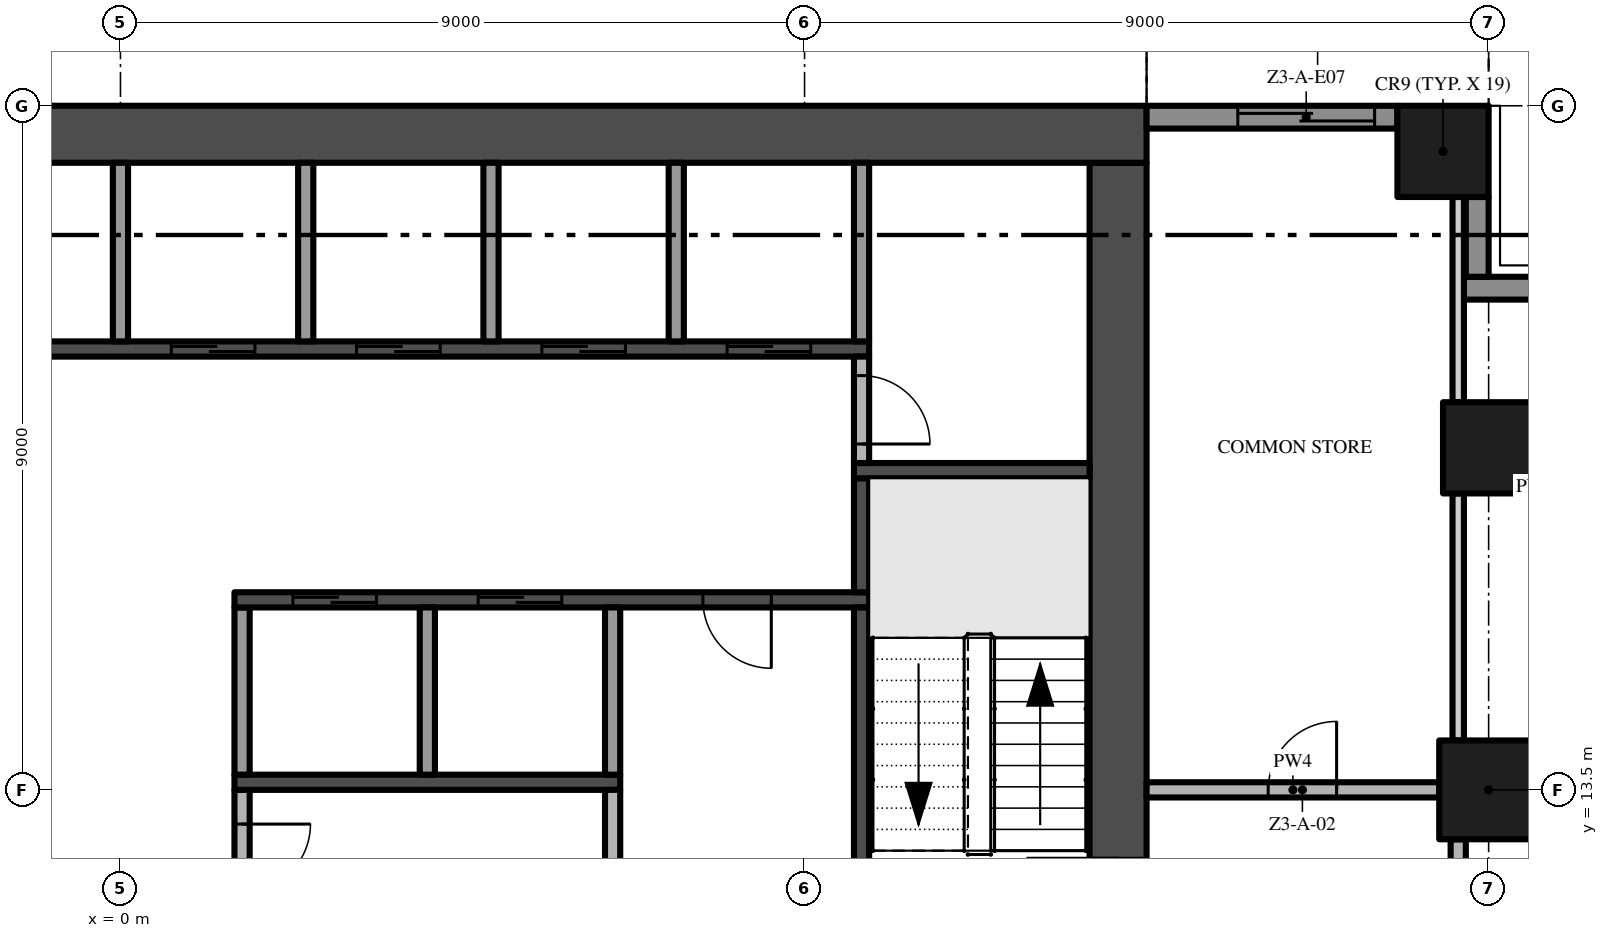
"""IFC4 building model, lengths in metres.
Left out: names, types, materials, properties, quantities, classifications, styles, units other than length and angle.
Written with IfcOpenShell. Run it as: python <this file> out.ifc"""

import sys

from ifc_helpers import new_model, si_unit, direction, frame, frame_2d, origin, origin_2d, place, context, subcontext, project, spatial, polyline, rectangle, outline, extrude, element, fill, save


model = new_model("IFC4")
c1 = context("Model", 3, precision=1e-05, world=origin(), true_north=direction((0.0, 1.0)))
c2 = subcontext(c1, "Body", "Model", "MODEL_VIEW")
j1 = project(units=[si_unit("LENGTHUNIT", "METRE"), si_unit("PLANEANGLEUNIT", "RADIAN")], contexts=[c1])
p1 = place(None, origin())
s1 = spatial("IfcSite", under=j1, at=p1, CompositionType="ELEMENT")
p2 = place(p1, origin())
s2 = spatial("IfcBuilding", under=s1, at=p2, CompositionType="ELEMENT")
p3 = place(p2, frame((0.0, 0.0, 125.0)))
s3 = spatial("IfcBuildingStorey", under=s2, at=p3, CompositionType="ELEMENT", Elevation=125.0)
p4 = place(p3, frame((13.125, 5.25, -0.3), z_axis=(0.0, 0.0, 1.0), x_axis=(0.0, 1.0, 0.0)))
e1 = element("IfcWall", 1, at=p4, inside=s3, PredefinedType="SHEAR", context=c2, shape_type="SweptSolid", body=[
    extrude(rectangle(XDim=16.5, YDim=0.75, at=frame_2d((8.25, 0.0))), origin(), (0.0, 0.0, 1.0), 3.8),
])
p5 = place(p4, frame((6.15, 0.0, 0.3)))
e2 = element("IfcOpeningElement", 2, at=p5, cuts=e1, PredefinedType="OPENING", context=c2, shape_type="SweptSolid", body=[
    extrude(rectangle(XDim=1.2, YDim=2.2, at=frame_2d((0.6, 1.1))), frame((0.0, 0.385, 0.0), z_axis=(0.0, -1.0, 0.0), x_axis=(1.0, 0.0, 0.0)), (0.0, 0.0, 1.0), 0.77),
])
p6 = place(p3, frame((13.5, 22.125, -0.3), z_axis=(0.0, 0.0, 1.0), x_axis=(-1.0, 0.0, 0.0)))
e3 = element("IfcWall", 3, at=p6, inside=s3, PredefinedType="SHEAR", context=c2, shape_type="SweptSolid", body=[
    extrude(rectangle(XDim=27.0, YDim=0.75, at=frame_2d((13.5, 0.0))), origin(), (0.0, 0.0, 1.0), 3.8),
])
p7 = place(p3, frame((18.0, 13.5, 0.0), z_axis=(0.0, 0.0, 1.0), x_axis=(1.0, 0.0, 0.0)))
e4 = element("IfcColumn", 4, at=p7, inside=s3, PredefinedType="COLUMN", context=c2, shape_type="SweptSolid", body=[
    extrude(rectangle(XDim=1.3, YDim=1.3, at=origin_2d()), origin(), (0.0, 0.0, 1.0), 3.5),
])
for number, where, z_axis, x_axis in (
    (5, (17.4, 21.9, 0.0), (0.0, 0.0, 1.0), (1.0, 0.0, 0.0)),
    (6, (18.0, 18.0, 0.0), (0.0, 0.0, 1.0), (1.0, 0.0, 0.0)),
):
    element("IfcColumn", number, at=place(p3, frame(where, z_axis=z_axis, x_axis=x_axis)), inside=s3, PredefinedType="COLUMN", context=c2, shape_type="SweptSolid", body=[
        extrude(rectangle(XDim=1.2, YDim=1.2, at=origin_2d()), origin(), (0.0, 0.0, 1.0), 3.5),
    ])
p8 = place(p3, frame((17.6, 20.1, 0.0), z_axis=(0.0, 0.0, 1.0), x_axis=(1.0, 0.0, 0.0)))
e7 = element("IfcWall", 7, at=p8, inside=s3, PredefinedType="SOLIDWALL", context=c2, shape_type="SweptSolid", body=[
    extrude(rectangle(XDim=2.35, YDim=0.3, at=frame_2d((1.175, 0.0))), origin(), (0.0, 0.0, 1.0), 3.5),
])
p9 = place(p3, frame((17.85, 21.3, 0.0), z_axis=(0.0, 0.0, 1.0), x_axis=(0.0, -1.0, 0.0)))
e8 = element("IfcWall", 8, at=p9, inside=s3, PredefinedType="SOLIDWALL", context=c2, shape_type="SweptSolid", body=[
    extrude(rectangle(XDim=1.05, YDim=0.3, at=frame_2d((0.525, 0.0))), origin(), (0.0, 0.0, 1.0), 3.5),
])
p10 = place(p3, frame((13.5, 22.35, 0.0), z_axis=(0.0, 0.0, 1.0), x_axis=(1.0, 0.0, 0.0)))
e9 = element("IfcWall", 9, at=p10, inside=s3, PredefinedType="SOLIDWALL", context=c2, shape_type="SweptSolid", body=[
    extrude(rectangle(XDim=3.3, YDim=0.3, at=frame_2d((1.65, 0.0))), origin(), (0.0, 0.0, 1.0), 3.5),
])
p11 = place(p10, frame((1.2, 0.0, 0.0)))
e10 = element("IfcOpeningElement", 10, at=p11, cuts=e9, PredefinedType="OPENING", context=c2, shape_type="SweptSolid", body=[
    extrude(rectangle(XDim=1.8, YDim=2.4, at=frame_2d((0.9, 1.2))), frame((0.0, 0.16, 0.0), z_axis=(0.0, -1.0, 0.0), x_axis=(1.0, 0.0, 0.0)), (0.0, 0.0, 1.0), 0.32),
])
p12 = place(p3, origin())
e11 = element("IfcWall", 11, at=p12, inside=s3, PredefinedType="USERDEFINED", context=c2, shape_type="SweptSolid", body=[
    extrude(outline(polyline([(18.0, 25.149), (16.5, 24.488), (15.0, 23.755), (13.5, 23.231), (13.583, 22.995), (15.096, 23.524), (16.605, 24.261), (18.101, 24.92), (18.0, 25.149)])), origin(), (0.0, 0.0, 1.0), 0.9),
])
p13 = place(p3, frame((-9.85, 19.3, 0.0), z_axis=(0.0, 0.0, 1.0), x_axis=(1.0, 0.0, 0.0)))
e12 = element("IfcWall", 12, at=p13, inside=s3, PredefinedType="SHEAR", context=c2, shape_type="SweptSolid", body=[
    extrude(rectangle(XDim=19.7, YDim=0.2, at=frame_2d((9.85, 0.0))), origin(), (0.0, 0.0, 1.0), 3.5),
])
p14 = place(p13, frame((10.519, 0.0, 0.0)))
e13 = element("IfcOpeningElement", 13, at=p14, cuts=e12, PredefinedType="OPENING", context=c2, shape_type="SweptSolid", body=[
    extrude(rectangle(XDim=1.1, YDim=2.1, at=frame_2d((0.55, 1.05))), frame((0.0, 0.11, 0.0), z_axis=(0.0, -1.0, 0.0), x_axis=(1.0, 0.0, 0.0)), (0.0, 0.0, 1.0), 0.22),
])
p15 = place(p13, frame((12.956, 0.0, 0.0)))
e14 = element("IfcOpeningElement", 14, at=p15, cuts=e12, PredefinedType="OPENING", context=c2, shape_type="SweptSolid", body=[
    extrude(rectangle(XDim=1.1, YDim=2.1, at=frame_2d((0.55, 1.05))), frame((0.0, 0.11, 0.0), z_axis=(0.0, -1.0, 0.0), x_axis=(1.0, 0.0, 0.0)), (0.0, 0.0, 1.0), 0.22),
])
p16 = place(p13, frame((15.394, 0.0, 0.0)))
e15 = element("IfcOpeningElement", 15, at=p16, cuts=e12, PredefinedType="OPENING", context=c2, shape_type="SweptSolid", body=[
    extrude(rectangle(XDim=1.1, YDim=2.1, at=frame_2d((0.55, 1.05))), frame((0.0, 0.11, 0.0), z_axis=(0.0, -1.0, 0.0), x_axis=(1.0, 0.0, 0.0)), (0.0, 0.0, 1.0), 0.22),
])
p17 = place(p13, frame((17.831, 0.0, 0.0)))
e16 = element("IfcOpeningElement", 16, at=p17, cuts=e12, PredefinedType="OPENING", context=c2, shape_type="SweptSolid", body=[
    extrude(rectangle(XDim=1.1, YDim=2.1, at=frame_2d((0.55, 1.05))), frame((0.0, 0.11, 0.0), z_axis=(0.0, -1.0, 0.0), x_axis=(1.0, 0.0, 0.0)), (0.0, 0.0, 1.0), 0.22),
])
p18 = place(p3, frame((0.0, 19.4, 0.0), z_axis=(0.0, 0.0, 1.0), x_axis=(0.0, 1.0, 0.0)))
e17 = element("IfcWall", 17, at=p18, inside=s3, PredefinedType="PARTITIONING", context=c2, shape_type="SweptSolid", body=[
    extrude(rectangle(XDim=2.35, YDim=0.2, at=frame_2d((1.175, 0.0))), origin(), (0.0, 0.0, 1.0), 3.5),
])
p19 = place(p3, frame((1.6, 13.5, 0.0), z_axis=(0.0, 0.0, 1.0), x_axis=(0.0, -1.0, 0.0)))
e18 = element("IfcWall", 18, at=p19, inside=s3, PredefinedType="PARTITIONING", context=c2, shape_type="SweptSolid", body=[
    extrude(rectangle(XDim=1.8, YDim=0.2, at=frame_2d((0.9, 0.0))), origin(), (0.0, 0.0, 1.0), 3.5),
])
p20 = place(p19, frame((0.45, 0.0, 0.0)))
e19 = element("IfcOpeningElement", 19, at=p20, cuts=e18, PredefinedType="OPENING", context=c2, shape_type="SweptSolid", body=[
    extrude(rectangle(XDim=0.9, YDim=2.1, at=frame_2d((0.45, 1.05))), frame((0.0, 0.11, 0.0), z_axis=(0.0, -1.0, 0.0), x_axis=(1.0, 0.0, 0.0)), (0.0, 0.0, 1.0), 0.22),
])
p21 = place(p3, frame((1.5, 13.6, 0.0), z_axis=(0.0, 0.0, 1.0), x_axis=(1.0, 0.0, 0.0)))
e20 = element("IfcWall", 20, at=p21, inside=s3, PredefinedType="SHEAR", context=c2, shape_type="SweptSolid", body=[
    extrude(rectangle(XDim=5.075, YDim=0.2, at=frame_2d((2.538, 0.0))), origin(), (0.0, 0.0, 1.0), 3.5),
])
p22 = place(p3, frame((1.6, 13.7, 0.0), z_axis=(0.0, 0.0, 1.0), x_axis=(0.0, 1.0, 0.0)))
e21 = element("IfcWall", 21, at=p22, inside=s3, PredefinedType="PARTITIONING", context=c2, shape_type="SweptSolid", body=[
    extrude(rectangle(XDim=2.2, YDim=0.2, at=frame_2d((1.1, 0.0))), origin(), (0.0, 0.0, 1.0), 3.5),
])
p23 = place(p3, frame((9.85, 16.0, 0.0), z_axis=(0.0, 0.0, 1.0), x_axis=(-1.0, 0.0, 0.0)))
e22 = element("IfcWall", 22, at=p23, inside=s3, PredefinedType="SHEAR", context=c2, shape_type="SweptSolid", body=[
    extrude(rectangle(XDim=8.35, YDim=0.2, at=frame_2d((4.175, 0.0))), origin(), (0.0, 0.0, 1.0), 3.5),
])
p24 = place(p23, frame((6.481, 0.0, 0.0)))
e23 = element("IfcOpeningElement", 23, at=p24, cuts=e22, PredefinedType="OPENING", context=c2, shape_type="SweptSolid", body=[
    extrude(rectangle(XDim=1.1, YDim=2.1, at=frame_2d((0.55, 1.05))), frame((0.0, 0.11, 0.0), z_axis=(0.0, -1.0, 0.0), x_axis=(1.0, 0.0, 0.0)), (0.0, 0.0, 1.0), 0.22),
])
p25 = place(p23, frame((4.044, 0.0, 0.0)))
e24 = element("IfcOpeningElement", 24, at=p25, cuts=e22, PredefinedType="OPENING", context=c2, shape_type="SweptSolid", body=[
    extrude(rectangle(XDim=1.1, YDim=2.1, at=frame_2d((0.55, 1.05))), frame((0.0, 0.11, 0.0), z_axis=(0.0, -1.0, 0.0), x_axis=(1.0, 0.0, 0.0)), (0.0, 0.0, 1.0), 0.22),
])
p26 = place(p23, frame((1.288, 0.0, 0.0)))
e25 = element("IfcOpeningElement", 25, at=p26, cuts=e22, PredefinedType="OPENING", context=c2, shape_type="SweptSolid", body=[
    extrude(rectangle(XDim=0.9, YDim=2.1, at=frame_2d((0.45, 1.05))), frame((0.0, 0.11, 0.0), z_axis=(0.0, -1.0, 0.0), x_axis=(1.0, 0.0, 0.0)), (0.0, 0.0, 1.0), 0.22),
])
p27 = place(p3, frame((2.438, 19.4, 0.0), z_axis=(0.0, 0.0, 1.0), x_axis=(0.0, 1.0, 0.0)))
e26 = element("IfcWall", 26, at=p27, inside=s3, PredefinedType="PARTITIONING", context=c2, shape_type="SweptSolid", body=[
    extrude(rectangle(XDim=2.35, YDim=0.2, at=frame_2d((1.175, 0.0))), origin(), (0.0, 0.0, 1.0), 3.5),
])
p28 = place(p3, frame((4.037, 13.7, 0.0), z_axis=(0.0, 0.0, 1.0), x_axis=(0.0, 1.0, 0.0)))
e27 = element("IfcWall", 27, at=p28, inside=s3, PredefinedType="PARTITIONING", context=c2, shape_type="SweptSolid", body=[
    extrude(rectangle(XDim=2.2, YDim=0.2, at=frame_2d((1.1, 0.0))), origin(), (0.0, 0.0, 1.0), 3.5),
])
p29 = place(p3, frame((4.875, 19.4, 0.0), z_axis=(0.0, 0.0, 1.0), x_axis=(0.0, 1.0, 0.0)))
e28 = element("IfcWall", 28, at=p29, inside=s3, PredefinedType="PARTITIONING", context=c2, shape_type="SweptSolid", body=[
    extrude(rectangle(XDim=2.35, YDim=0.2, at=frame_2d((1.175, 0.0))), origin(), (0.0, 0.0, 1.0), 3.5),
])
p30 = place(p3, frame((6.475, 12.3, 0.0), z_axis=(0.0, 0.0, 1.0), x_axis=(0.0, 1.0, 0.0)))
e29 = element("IfcWall", 29, at=p30, inside=s3, PredefinedType="PARTITIONING", context=c2, shape_type="SweptSolid", body=[
    extrude(rectangle(XDim=1.2, YDim=0.2, at=frame_2d((0.6, 0.0))), origin(), (0.0, 0.0, 1.0), 3.5),
])
p31 = place(p3, frame((6.475, 13.7, 0.0), z_axis=(0.0, 0.0, 1.0), x_axis=(0.0, 1.0, 0.0)))
e30 = element("IfcWall", 30, at=p31, inside=s3, PredefinedType="PARTITIONING", context=c2, shape_type="SweptSolid", body=[
    extrude(rectangle(XDim=2.2, YDim=0.2, at=frame_2d((1.1, 0.0))), origin(), (0.0, 0.0, 1.0), 3.5),
])
p32 = place(p3, frame((7.312, 19.4, 0.0), z_axis=(0.0, 0.0, 1.0), x_axis=(0.0, 1.0, 0.0)))
e31 = element("IfcWall", 31, at=p32, inside=s3, PredefinedType="PARTITIONING", context=c2, shape_type="SweptSolid", body=[
    extrude(rectangle(XDim=2.35, YDim=0.2, at=frame_2d((1.175, 0.0))), origin(), (0.0, 0.0, 1.0), 3.5),
])
p33 = place(p3, frame((9.75, 12.3, 0.0), z_axis=(0.0, 0.0, 1.0), x_axis=(0.0, 1.0, 0.0)))
e32 = element("IfcWall", 32, at=p33, inside=s3, PredefinedType="SHEAR", context=c2, shape_type="SweptSolid", body=[
    extrude(rectangle(XDim=3.6, YDim=0.2, at=frame_2d((1.8, 0.0))), origin(), (0.0, 0.0, 1.0), 3.5),
])
p34 = place(p3, frame((9.75, 16.1, 0.0), z_axis=(0.0, 0.0, 1.0), x_axis=(0.0, 1.0, 0.0)))
e33 = element("IfcWall", 33, at=p34, inside=s3, PredefinedType="SHEAR", context=c2, shape_type="SweptSolid", body=[
    extrude(rectangle(XDim=1.5, YDim=0.2, at=frame_2d((0.75, 0.0))), origin(), (0.0, 0.0, 1.0), 3.5),
])
p35 = place(p3, frame((9.65, 17.7, 0.0), z_axis=(0.0, 0.0, 1.0), x_axis=(1.0, 0.0, 0.0)))
e34 = element("IfcWall", 34, at=p35, inside=s3, PredefinedType="SHEAR", context=c2, shape_type="SweptSolid", body=[
    extrude(rectangle(XDim=3.1, YDim=0.2, at=frame_2d((1.55, 0.0))), origin(), (0.0, 0.0, 1.0), 3.5),
])
p36 = place(p3, frame((9.75, 19.2, 0.0), z_axis=(0.0, 0.0, 1.0), x_axis=(0.0, -1.0, 0.0)))
e35 = element("IfcWall", 35, at=p36, inside=s3, PredefinedType="PARTITIONING", context=c2, shape_type="SweptSolid", body=[
    extrude(rectangle(XDim=1.4, YDim=0.2, at=frame_2d((0.7, 0.0))), origin(), (0.0, 0.0, 1.0), 3.5),
])
p37 = place(p36, frame((0.25, 0.0, 0.0)))
e36 = element("IfcOpeningElement", 36, at=p37, cuts=e35, PredefinedType="OPENING", context=c2, shape_type="SweptSolid", body=[
    extrude(rectangle(XDim=0.9, YDim=2.1, at=frame_2d((0.45, 1.05))), frame((0.0, 0.11, 0.0), z_axis=(0.0, -1.0, 0.0), x_axis=(1.0, 0.0, 0.0)), (0.0, 0.0, 1.0), 0.22),
])
p38 = place(p3, frame((9.75, 19.4, 0.0), z_axis=(0.0, 0.0, 1.0), x_axis=(0.0, 1.0, 0.0)))
e37 = element("IfcWall", 37, at=p38, inside=s3, PredefinedType="PARTITIONING", context=c2, shape_type="SweptSolid", body=[
    extrude(rectangle(XDim=2.35, YDim=0.2, at=frame_2d((1.175, 0.0))), origin(), (0.0, 0.0, 1.0), 3.5),
])
p39 = place(p3, frame((13.5, 13.5, 0.0), z_axis=(0.0, 0.0, 1.0), x_axis=(1.0, 0.0, 0.0)))
e38 = element("IfcWall", 38, at=p39, inside=s3, PredefinedType="PARTITIONING", context=c2, shape_type="SweptSolid", body=[
    extrude(rectangle(XDim=3.85, YDim=0.2, at=frame_2d((1.925, 0.0))), origin(), (0.0, 0.0, 1.0), 3.5),
])
p40 = place(p39, frame((1.6, 0.0, 0.0)))
e39 = element("IfcOpeningElement", 39, at=p40, cuts=e38, PredefinedType="OPENING", context=c2, shape_type="SweptSolid", body=[
    extrude(rectangle(XDim=0.9, YDim=2.1, at=frame_2d((0.45, 1.05))), frame((0.0, 0.11, 0.0), z_axis=(0.0, -1.0, 0.0), x_axis=(1.0, 0.0, 0.0)), (0.0, 0.0, 1.0), 0.22),
])
p41 = place(p3, frame((17.6, 12.85, 0.0), z_axis=(0.0, 0.0, 1.0), x_axis=(0.0, -1.0, 0.0)))
e40 = element("IfcWall", 40, at=p41, inside=s3, PredefinedType="PARTITIONING", context=c2, shape_type="SweptSolid", body=[
    extrude(rectangle(XDim=7.7, YDim=0.2, at=frame_2d((3.85, 0.0))), origin(), (0.0, 0.0, 1.0), 3.5),
])
p42 = place(p41, frame((5.5, 0.0, 0.0)))
e41 = element("IfcOpeningElement", 41, at=p42, cuts=e40, PredefinedType="OPENING", context=c2, shape_type="SweptSolid", body=[
    extrude(rectangle(XDim=1.2, YDim=2.4, at=frame_2d((0.6, 1.2))), frame((0.0, 0.11, 0.0), z_axis=(0.0, -1.0, 0.0), x_axis=(1.0, 0.0, 0.0)), (0.0, 0.0, 1.0), 0.22),
])
p43 = place(p3, frame((17.6, 14.15, 0.0), z_axis=(0.0, 0.0, 1.0), x_axis=(0.0, 1.0, 0.0)))
e42 = element("IfcWall", 42, at=p43, inside=s3, PredefinedType="PARTITIONING", context=c2, shape_type="SweptSolid", body=[
    extrude(rectangle(XDim=3.25, YDim=0.15, at=frame_2d((1.625, 0.0))), origin(), (0.0, 0.0, 1.0), 3.5),
])
p44 = place(p3, frame((17.6, 18.6, 0.0), z_axis=(0.0, 0.0, 1.0), x_axis=(0.0, 1.0, 0.0)))
e43 = element("IfcWall", 43, at=p44, inside=s3, PredefinedType="PARTITIONING", context=c2, shape_type="SweptSolid", body=[
    extrude(rectangle(XDim=2.7, YDim=0.15, at=frame_2d((1.35, 0.0))), origin(), (0.0, 0.0, 1.0), 3.5),
])
p45 = place(p11, origin())
e44 = element("IfcDoor", 44, at=p45, inside=s3, OperationType="SINGLE_SWING_LEFT", PredefinedType="DOOR", context=c2, shape_type="SweptSolid", body=[
    extrude(rectangle(XDim=1.8, YDim=2.4, at=frame_2d((0.9, 1.2))), frame((0.0, 0.025, 0.0), z_axis=(0.0, -1.0, 0.0), x_axis=(1.0, 0.0, 0.0)), (0.0, 0.0, 1.0), 0.05),
])
fill(e10, e44)
p46 = place(p14, origin())
e45 = element("IfcDoor", 45, at=p46, inside=s3, OperationType="SLIDING_TO_RIGHT", PredefinedType="DOOR", context=c2, shape_type="SweptSolid", body=[
    extrude(rectangle(XDim=1.1, YDim=2.1, at=frame_2d((0.55, 1.05))), frame((0.0, 0.025, 0.0), z_axis=(0.0, -1.0, 0.0), x_axis=(1.0, 0.0, 0.0)), (0.0, 0.0, 1.0), 0.05),
])
fill(e13, e45)
p47 = place(p15, origin())
e46 = element("IfcDoor", 46, at=p47, inside=s3, OperationType="SLIDING_TO_RIGHT", PredefinedType="DOOR", context=c2, shape_type="SweptSolid", body=[
    extrude(rectangle(XDim=1.1, YDim=2.1, at=frame_2d((0.55, 1.05))), frame((0.0, 0.025, 0.0), z_axis=(0.0, -1.0, 0.0), x_axis=(1.0, 0.0, 0.0)), (0.0, 0.0, 1.0), 0.05),
])
fill(e14, e46)
p48 = place(p16, origin())
e47 = element("IfcDoor", 47, at=p48, inside=s3, OperationType="SLIDING_TO_RIGHT", PredefinedType="DOOR", context=c2, shape_type="SweptSolid", body=[
    extrude(rectangle(XDim=1.1, YDim=2.1, at=frame_2d((0.55, 1.05))), frame((0.0, 0.025, 0.0), z_axis=(0.0, -1.0, 0.0), x_axis=(1.0, 0.0, 0.0)), (0.0, 0.0, 1.0), 0.05),
])
fill(e15, e47)
p49 = place(p17, origin())
e48 = element("IfcDoor", 48, at=p49, inside=s3, OperationType="SLIDING_TO_RIGHT", PredefinedType="DOOR", context=c2, shape_type="SweptSolid", body=[
    extrude(rectangle(XDim=1.1, YDim=2.1, at=frame_2d((0.55, 1.05))), frame((0.0, 0.025, 0.0), z_axis=(0.0, -1.0, 0.0), x_axis=(1.0, 0.0, 0.0)), (0.0, 0.0, 1.0), 0.05),
])
fill(e16, e48)
p50 = place(p24, origin())
e49 = element("IfcDoor", 49, at=p50, inside=s3, OperationType="SLIDING_TO_RIGHT", PredefinedType="DOOR", context=c2, shape_type="SweptSolid", body=[
    extrude(rectangle(XDim=1.1, YDim=2.1, at=frame_2d((0.55, 1.05))), frame((0.0, 0.025, 0.0), z_axis=(0.0, -1.0, 0.0), x_axis=(1.0, 0.0, 0.0)), (0.0, 0.0, 1.0), 0.05),
])
fill(e23, e49)
p51 = place(p25, origin())
e50 = element("IfcDoor", 50, at=p51, inside=s3, OperationType="SLIDING_TO_RIGHT", PredefinedType="DOOR", context=c2, shape_type="SweptSolid", body=[
    extrude(rectangle(XDim=1.1, YDim=2.1, at=frame_2d((0.55, 1.05))), frame((0.0, 0.025, 0.0), z_axis=(0.0, -1.0, 0.0), x_axis=(1.0, 0.0, 0.0)), (0.0, 0.0, 1.0), 0.05),
])
fill(e24, e50)
p52 = place(p20, origin())
e51 = element("IfcDoor", 51, at=p52, inside=s3, OperationType="SINGLE_SWING_LEFT", PredefinedType="DOOR", context=c2, shape_type="SweptSolid", body=[
    extrude(rectangle(XDim=0.9, YDim=2.1, at=frame_2d((0.45, 1.05))), frame((0.0, 0.025, 0.0), z_axis=(0.0, -1.0, 0.0), x_axis=(1.0, 0.0, 0.0)), (0.0, 0.0, 1.0), 0.05),
])
fill(e19, e51)
p53 = place(p26, origin())
e52 = element("IfcDoor", 52, at=p53, inside=s3, OperationType="SINGLE_SWING_LEFT", PredefinedType="DOOR", context=c2, shape_type="SweptSolid", body=[
    extrude(rectangle(XDim=0.9, YDim=2.1, at=frame_2d((0.45, 1.05))), frame((0.0, 0.025, 0.0), z_axis=(0.0, -1.0, 0.0), x_axis=(1.0, 0.0, 0.0)), (0.0, 0.0, 1.0), 0.05),
])
fill(e25, e52)
p54 = place(p37, origin())
e53 = element("IfcDoor", 53, at=p54, inside=s3, OperationType="SINGLE_SWING_RIGHT", PredefinedType="DOOR", context=c2, shape_type="SweptSolid", body=[
    extrude(rectangle(XDim=0.9, YDim=2.1, at=frame_2d((0.45, 1.05))), frame((0.0, 0.025, 0.0), z_axis=(0.0, -1.0, 0.0), x_axis=(1.0, 0.0, 0.0)), (0.0, 0.0, 1.0), 0.05),
])
fill(e36, e53)
p55 = place(p40, origin())
e54 = element("IfcDoor", 54, at=p55, inside=s3, OperationType="SINGLE_SWING_RIGHT", PredefinedType="DOOR", context=c2, shape_type="SweptSolid", body=[
    extrude(rectangle(XDim=0.9, YDim=2.1, at=frame_2d((0.45, 1.05))), frame((0.0, 0.025, 0.0), z_axis=(0.0, -1.0, 0.0), x_axis=(1.0, 0.0, 0.0)), (0.0, 0.0, 1.0), 0.05),
])
fill(e39, e54)
save(model, sys.argv[1])
